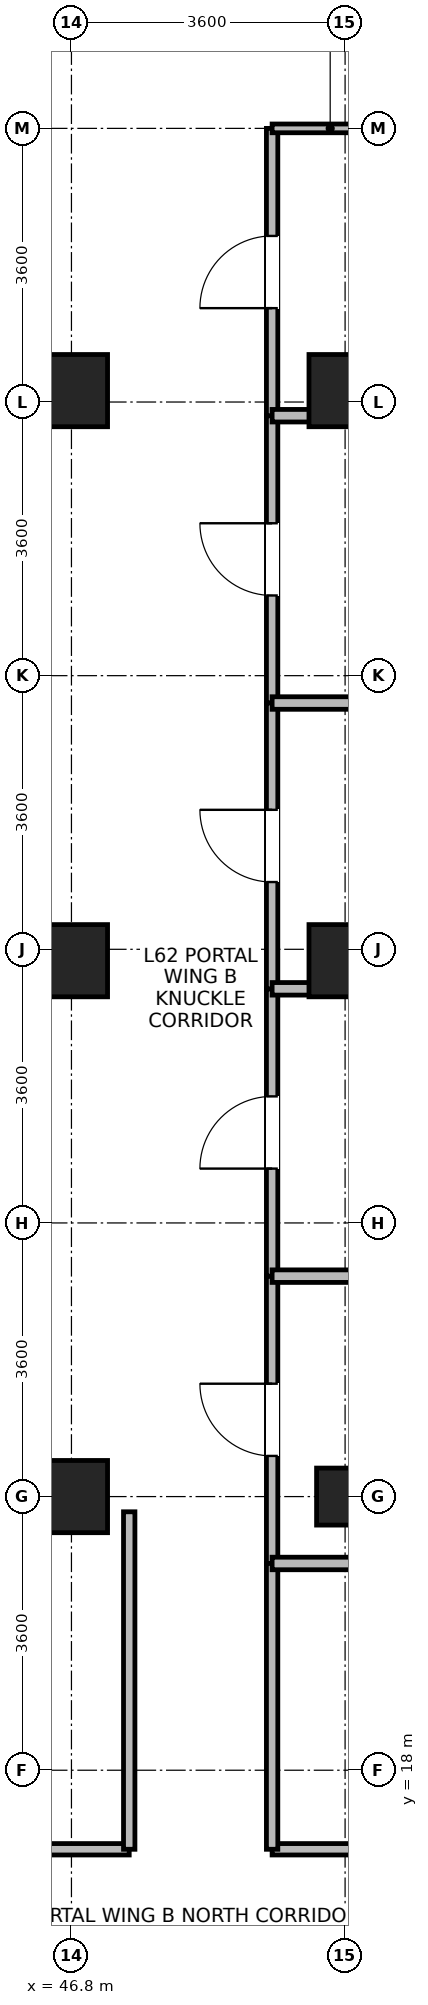
"""IFC4 building model, lengths in metres.
Left out: names, types, materials, properties, quantities, classifications, styles, units other than length and angle.
Written with IfcOpenShell. Run it as: python <this file> out.ifc"""

import sys

from ifc_helpers import new_model, si_unit, direction, frame, frame_2d, origin, origin_2d, place, context, subcontext, project, spatial, rectangle, extrude, source, transform, mapped, element, fill, save


model = new_model("IFC4")
c1 = context("Model", 3, precision=1e-05, world=origin(), true_north=direction((0.0, 1.0)))
c2 = subcontext(c1, "Body", "Model", "MODEL_VIEW")
j1 = project(units=[si_unit("LENGTHUNIT", "METRE"), si_unit("PLANEANGLEUNIT", "RADIAN")], contexts=[c1])
p1 = place(None, origin())
s1 = spatial("IfcSite", under=j1, at=p1, CompositionType="ELEMENT")
p2 = place(p1, origin())
s2 = spatial("IfcBuilding", under=s1, at=p2, CompositionType="ELEMENT")
p3 = place(p2, frame((0.0, 0.0, 242.5)))
s3 = spatial("IfcBuildingStorey", under=s2, at=p3, CompositionType="ELEMENT", Elevation=242.5)
m1 = source(origin(), c2, "Body", "SweptSolid", [
    extrude(rectangle(XDim=0.95, YDim=0.95, at=origin_2d()), origin(), (0.0, 0.0, 1.0), 3.7),
])
for number, where, z_axis, x_axis in (
    (1, (46.8, 21.6, 0.0), (0.0, 0.0, 1.0), (1.0, 0.0, 0.0)),
    (2, (46.8, 28.65, 0.0), (0.0, 0.0, 1.0), (1.0, 0.0, 0.0)),
    (3, (46.8, 36.15, 0.0), (0.0, 0.0, 1.0), (1.0, 0.0, 0.0)),
):
    element("IfcColumn", number, at=place(p3, frame(where, z_axis=z_axis, x_axis=x_axis)), inside=s3, PredefinedType="COLUMN", context=c2, shape_type="MappedRepresentation", body=[
        mapped(m1, transform((0.0, 0.0, 0.0), x_axis=(1.0, 0.0, 0.0), y_axis=(0.0, 1.0, 0.0), z_axis=(0.0, 0.0, 1.0), scale=1.0)),
    ])
m2 = source(origin(), c2, "Body", "SweptSolid", [
    extrude(rectangle(XDim=0.75, YDim=0.75, at=origin_2d()), origin(), (0.0, 0.0, 1.0), 3.7),
])
p4 = place(p3, frame((50.4, 21.6, 0.0), z_axis=(0.0, 0.0, 1.0), x_axis=(1.0, 0.0, 0.0)))
e4 = element("IfcColumn", 4, at=p4, inside=s3, PredefinedType="PILASTER", context=c2, shape_type="MappedRepresentation", body=[
    mapped(m2, transform((0.0, 0.0, 0.0), x_axis=(1.0, 0.0, 0.0), y_axis=(0.0, 1.0, 0.0), z_axis=(0.0, 0.0, 1.0), scale=1.0)),
])
for number, where, z_axis, x_axis in (
    (5, (50.4, 28.65, 0.0), (0.0, 0.0, 1.0), (1.0, 0.0, 0.0)),
    (6, (50.4, 36.15, 0.0), (0.0, 0.0, 1.0), (1.0, 0.0, 0.0)),
):
    element("IfcColumn", number, at=place(p3, frame(where, z_axis=z_axis, x_axis=x_axis)), inside=s3, PredefinedType="COLUMN", context=c2, shape_type="MappedRepresentation", body=[
        mapped(m1, transform((0.0, 0.0, 0.0), x_axis=(1.0, 0.0, 0.0), y_axis=(0.0, 1.0, 0.0), z_axis=(0.0, 0.0, 1.0), scale=1.0)),
    ])
p5 = place(p3, frame((35.52, 16.96, 0.0), z_axis=(0.0, 0.0, 1.0), x_axis=(1.0, 0.0, 0.0)))
e7 = element("IfcWall", 7, at=p5, inside=s3, PredefinedType="PARTITIONING", context=c2, shape_type="SweptSolid", body=[
    extrude(rectangle(XDim=12.04, YDim=0.15, at=frame_2d((6.02, 0.0))), origin(), (0.0, 0.0, 1.0), 3.42),
])
p6 = place(p5, frame((5.37, 0.0, 0.0)))
e8 = element("IfcOpeningElement", 8, at=p6, cuts=e7, PredefinedType="OPENING", context=c2, shape_type="SweptSolid", body=[
    extrude(rectangle(XDim=1.3, YDim=2.12, at=frame_2d((0.65, 1.06))), frame((0.0, 0.085, 0.0), z_axis=(0.0, -1.0, 0.0), x_axis=(1.0, 0.0, 0.0)), (0.0, 0.0, 1.0), 0.17),
])
p7 = place(p3, frame((49.44, 16.96, 0.0), z_axis=(0.0, 0.0, 1.0), x_axis=(1.0, 0.0, 0.0)))
e9 = element("IfcWall", 9, at=p7, inside=s3, PredefinedType="PARTITIONING", context=c2, shape_type="SweptSolid", body=[
    extrude(rectangle(XDim=11.128, YDim=0.15, at=frame_2d((5.564, 0.0))), origin(), (0.0, 0.0, 1.0), 3.42),
])
p8 = place(p7, frame((5.089, 0.0, 0.0)))
e10 = element("IfcOpeningElement", 10, at=p8, cuts=e9, PredefinedType="OPENING", context=c2, shape_type="SweptSolid", body=[
    extrude(rectangle(XDim=0.95, YDim=2.1, at=frame_2d((0.475, 1.05))), frame((0.0, 0.085, 0.0), z_axis=(0.0, -1.0, 0.0), x_axis=(1.0, 0.0, 0.0)), (0.0, 0.0, 1.0), 0.17),
])
p9 = place(p3, frame((47.56, 16.96, 0.0), z_axis=(0.0, 0.0, 1.0), x_axis=(0.0, 1.0, 0.0)))
e11 = element("IfcWall", 11, at=p9, inside=s3, PredefinedType="PARTITIONING", context=c2, shape_type="SweptSolid", body=[
    extrude(rectangle(XDim=4.44, YDim=0.15, at=frame_2d((2.22, 0.0))), origin(), (0.0, 0.0, 1.0), 3.42),
])
p10 = place(p3, frame((49.44, 20.72, 0.0), z_axis=(0.0, 0.0, 1.0), x_axis=(0.0, 1.0, 0.0)))
e12 = element("IfcWall", 12, at=p10, inside=s3, PredefinedType="PARTITIONING", context=c2, shape_type="SweptSolid", body=[
    extrude(rectangle(XDim=3.78, YDim=0.15, at=frame_2d((1.89, 0.0))), origin(), (0.0, 0.0, 1.0), 3.42),
])
p11 = place(p10, frame((1.415, 0.0, 0.0)))
e13 = element("IfcOpeningElement", 13, at=p11, cuts=e12, PredefinedType="OPENING", context=c2, shape_type="SweptSolid", body=[
    extrude(rectangle(XDim=0.95, YDim=2.1, at=frame_2d((0.475, 1.05))), frame((0.0, 0.085, 0.0), z_axis=(0.0, -1.0, 0.0), x_axis=(1.0, 0.0, 0.0)), (0.0, 0.0, 1.0), 0.17),
])
p12 = place(p3, frame((49.44, 24.5, 0.0), z_axis=(0.0, 0.0, 1.0), x_axis=(0.0, 1.0, 0.0)))
e14 = element("IfcWall", 14, at=p12, inside=s3, PredefinedType="PARTITIONING", context=c2, shape_type="SweptSolid", body=[
    extrude(rectangle(XDim=3.78, YDim=0.15, at=frame_2d((1.89, 0.0))), origin(), (0.0, 0.0, 1.0), 3.42),
])
p13 = place(p12, frame((1.415, 0.0, 0.0)))
e15 = element("IfcOpeningElement", 15, at=p13, cuts=e14, PredefinedType="OPENING", context=c2, shape_type="SweptSolid", body=[
    extrude(rectangle(XDim=0.95, YDim=2.1, at=frame_2d((0.475, 1.05))), frame((0.0, 0.085, 0.0), z_axis=(0.0, -1.0, 0.0), x_axis=(1.0, 0.0, 0.0)), (0.0, 0.0, 1.0), 0.17),
])
p14 = place(p3, frame((49.44, 32.04, 0.0), z_axis=(0.0, 0.0, 1.0), x_axis=(0.0, 1.0, 0.0)))
e16 = element("IfcWall", 16, at=p14, inside=s3, PredefinedType="PARTITIONING", context=c2, shape_type="SweptSolid", body=[
    extrude(rectangle(XDim=3.78, YDim=0.15, at=frame_2d((1.89, 0.0))), origin(), (0.0, 0.0, 1.0), 3.42),
])
p15 = place(p14, frame((1.415, 0.0, 0.0)))
e17 = element("IfcOpeningElement", 17, at=p15, cuts=e16, PredefinedType="OPENING", context=c2, shape_type="SweptSolid", body=[
    extrude(rectangle(XDim=0.95, YDim=2.1, at=frame_2d((0.475, 1.05))), frame((0.0, 0.085, 0.0), z_axis=(0.0, -1.0, 0.0), x_axis=(1.0, 0.0, 0.0)), (0.0, 0.0, 1.0), 0.17),
])
p16 = place(p3, frame((49.44, 35.82, 0.0), z_axis=(0.0, 0.0, 1.0), x_axis=(0.0, 1.0, 0.0)))
e18 = element("IfcWall", 18, at=p16, inside=s3, PredefinedType="PARTITIONING", context=c2, shape_type="SweptSolid", body=[
    extrude(rectangle(XDim=3.78, YDim=0.15, at=frame_2d((1.89, 0.0))), origin(), (0.0, 0.0, 1.0), 3.42),
])
p17 = place(p16, frame((1.415, 0.0, 0.0)))
e19 = element("IfcOpeningElement", 19, at=p17, cuts=e18, PredefinedType="OPENING", context=c2, shape_type="SweptSolid", body=[
    extrude(rectangle(XDim=0.95, YDim=2.1, at=frame_2d((0.475, 1.05))), frame((0.0, 0.085, 0.0), z_axis=(0.0, -1.0, 0.0), x_axis=(1.0, 0.0, 0.0)), (0.0, 0.0, 1.0), 0.17),
])
p18 = place(p3, frame((49.44, 16.96, 0.0), z_axis=(0.0, 0.0, 1.0), x_axis=(0.0, 1.0, 0.0)))
e20 = element("IfcWall", 20, at=p18, inside=s3, PredefinedType="PARTITIONING", context=c2, shape_type="SweptSolid", body=[
    extrude(rectangle(XDim=3.76, YDim=0.15, at=frame_2d((1.88, 0.0))), origin(), (0.0, 0.0, 1.0), 3.42),
])
p19 = place(p3, frame((49.44, 28.28, 0.0), z_axis=(0.0, 0.0, 1.0), x_axis=(0.0, 1.0, 0.0)))
e21 = element("IfcWall", 21, at=p19, inside=s3, PredefinedType="PARTITIONING", context=c2, shape_type="SweptSolid", body=[
    extrude(rectangle(XDim=3.76, YDim=0.15, at=frame_2d((1.88, 0.0))), origin(), (0.0, 0.0, 1.0), 3.42),
])
p20 = place(p19, frame((1.405, 0.0, 0.0)))
e22 = element("IfcOpeningElement", 22, at=p20, cuts=e21, PredefinedType="OPENING", context=c2, shape_type="SweptSolid", body=[
    extrude(rectangle(XDim=0.95, YDim=2.1, at=frame_2d((0.475, 1.05))), frame((0.0, 0.085, 0.0), z_axis=(0.0, -1.0, 0.0), x_axis=(1.0, 0.0, 0.0)), (0.0, 0.0, 1.0), 0.17),
])
for number, where, z_axis, x_axis in (
    (23, (49.44, 20.72, 0.0), (0.0, 0.0, 1.0), (1.0, 0.0, 0.0)),
    (24, (49.44, 24.5, 0.0), (0.0, 0.0, 1.0), (1.0, 0.0, 0.0)),
    (25, (49.44, 28.28, 0.0), (0.0, 0.0, 1.0), (1.0, 0.0, 0.0)),
    (26, (49.44, 32.04, 0.0), (0.0, 0.0, 1.0), (1.0, 0.0, 0.0)),
    (27, (49.44, 35.82, 0.0), (0.0, 0.0, 1.0), (1.0, 0.0, 0.0)),
):
    element("IfcWall", number, at=place(p3, frame(where, z_axis=z_axis, x_axis=x_axis)), inside=s3, PredefinedType="PARTITIONING", context=c2, shape_type="SweptSolid", body=[
        extrude(rectangle(XDim=11.128, YDim=0.165, at=frame_2d((5.564, 0.0))), origin(), (0.0, 0.0, 1.0), 3.42),
    ])
p21 = place(p3, frame((49.44, 39.6, 0.0), z_axis=(0.0, 0.0, 1.0), x_axis=(1.0, 0.0, 0.0)))
e28 = element("IfcWall", 28, at=p21, inside=s3, PredefinedType="PARTITIONING", context=c2, shape_type="SweptSolid", body=[
    extrude(rectangle(XDim=1.528, YDim=0.115, at=frame_2d((0.764, 0.0))), origin(), (0.0, 0.0, 1.0), 3.42),
])
p22 = place(p11, origin())
e29 = element("IfcDoor", 29, at=p22, inside=s3, OperationType="SINGLE_SWING_RIGHT", PredefinedType="DOOR", context=c2, shape_type="SweptSolid", body=[
    extrude(rectangle(XDim=0.95, YDim=2.1, at=frame_2d((0.475, 1.05))), frame((0.0, 0.025, 0.0), z_axis=(0.0, -1.0, 0.0), x_axis=(1.0, 0.0, 0.0)), (0.0, 0.0, 1.0), 0.05),
])
fill(e13, e29)
p23 = place(p13, origin())
e30 = element("IfcDoor", 30, at=p23, inside=s3, OperationType="SINGLE_SWING_LEFT", PredefinedType="DOOR", context=c2, shape_type="SweptSolid", body=[
    extrude(rectangle(XDim=0.95, YDim=2.1, at=frame_2d((0.475, 1.05))), frame((0.0, 0.025, 0.0), z_axis=(0.0, -1.0, 0.0), x_axis=(1.0, 0.0, 0.0)), (0.0, 0.0, 1.0), 0.05),
])
fill(e15, e30)
p24 = place(p15, origin())
e31 = element("IfcDoor", 31, at=p24, inside=s3, OperationType="SINGLE_SWING_RIGHT", PredefinedType="DOOR", context=c2, shape_type="SweptSolid", body=[
    extrude(rectangle(XDim=0.95, YDim=2.1, at=frame_2d((0.475, 1.05))), frame((0.0, 0.025, 0.0), z_axis=(0.0, -1.0, 0.0), x_axis=(1.0, 0.0, 0.0)), (0.0, 0.0, 1.0), 0.05),
])
fill(e17, e31)
p25 = place(p17, origin())
e32 = element("IfcDoor", 32, at=p25, inside=s3, OperationType="SINGLE_SWING_LEFT", PredefinedType="DOOR", context=c2, shape_type="SweptSolid", body=[
    extrude(rectangle(XDim=0.95, YDim=2.1, at=frame_2d((0.475, 1.05))), frame((0.0, 0.025, 0.0), z_axis=(0.0, -1.0, 0.0), x_axis=(1.0, 0.0, 0.0)), (0.0, 0.0, 1.0), 0.05),
])
fill(e19, e32)
p26 = place(p20, origin())
e33 = element("IfcDoor", 33, at=p26, inside=s3, OperationType="SINGLE_SWING_RIGHT", PredefinedType="DOOR", context=c2, shape_type="SweptSolid", body=[
    extrude(rectangle(XDim=0.95, YDim=2.1, at=frame_2d((0.475, 1.05))), frame((0.0, 0.025, 0.0), z_axis=(0.0, -1.0, 0.0), x_axis=(1.0, 0.0, 0.0)), (0.0, 0.0, 1.0), 0.05),
])
fill(e22, e33)
save(model, sys.argv[1])
